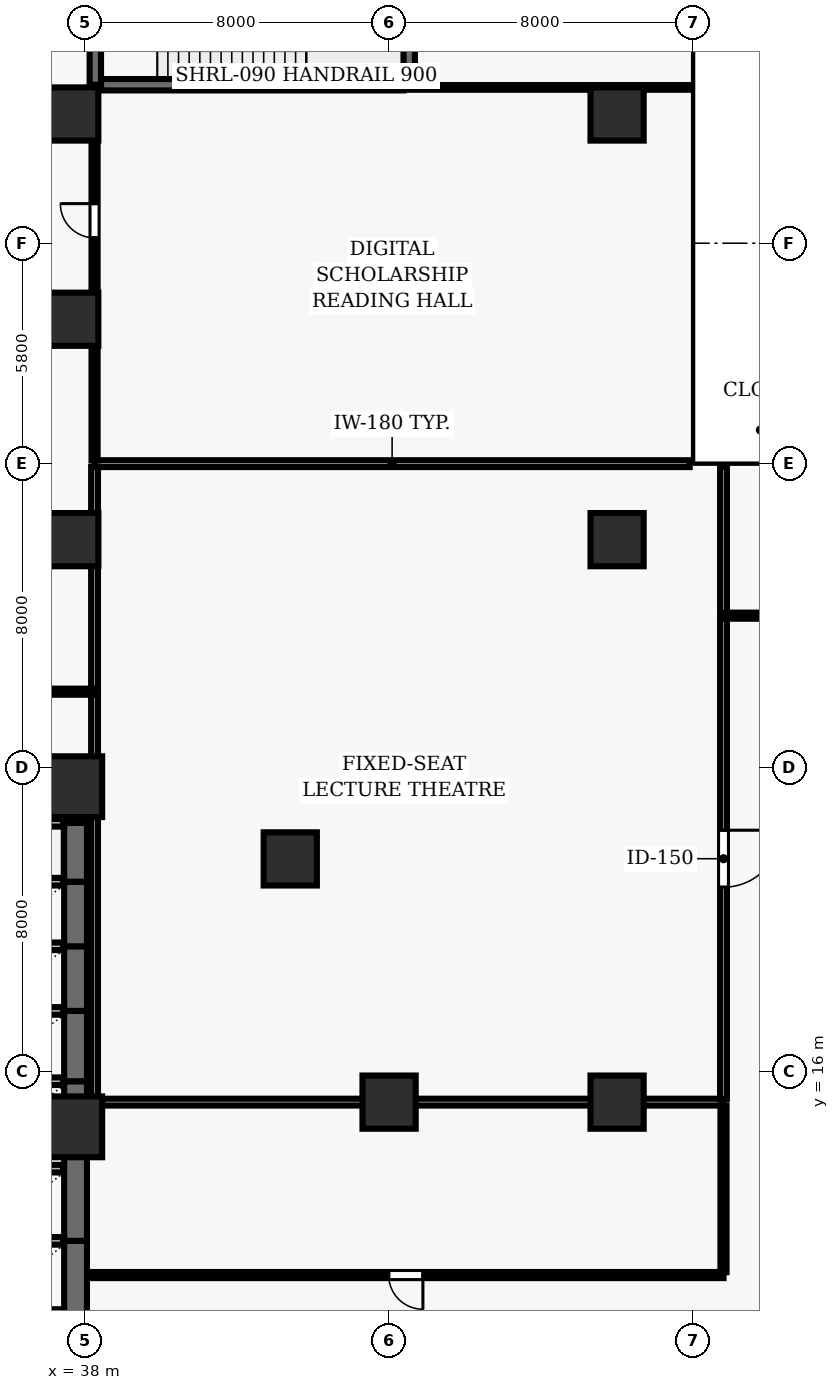
"""IFC4 building model, lengths in metres.
Left out: names, types, materials, properties, quantities, classifications, styles, units other than length and angle.
Written with IfcOpenShell. Run it as: python <this file> out.ifc"""

import sys

from ifc_helpers import new_model, si_unit, direction, frame, frame_2d, origin, origin_2d, place, context, subcontext, project, spatial, rectangle, extrude, element, fill, save


model = new_model("IFC4")
c1 = context("Model", 3, precision=1e-05, world=origin(), true_north=direction((0.0, 1.0)))
c2 = subcontext(c1, "Body", "Model", "MODEL_VIEW")
j1 = project(units=[si_unit("LENGTHUNIT", "METRE"), si_unit("PLANEANGLEUNIT", "RADIAN")], contexts=[c1])
p1 = place(None, origin())
s1 = spatial("IfcSite", under=j1, at=p1, CompositionType="ELEMENT")
p2 = place(p1, origin())
s2 = spatial("IfcBuilding", under=s1, at=p2, CompositionType="ELEMENT")
p3 = place(p2, frame((0.0, 0.0, 10.4)))
s3 = spatial("IfcBuildingStorey", under=s2, at=p3, CompositionType="ELEMENT", Elevation=10.4)
for number, where, z_axis, x_axis in (
    (1, (37.65, 14.55, 0.0), (0.0, 0.0, 1.0), (1.0, 0.0, 0.0)),
    (2, (37.65, 23.5, 0.0), (0.0, 0.0, 1.0), (1.0, 0.0, 0.0)),
):
    element("IfcColumn", number, at=place(p3, frame(where, z_axis=z_axis, x_axis=x_axis)), inside=s3, PredefinedType="COLUMN", context=c2, shape_type="SweptSolid", body=[
        extrude(rectangle(XDim=1.6, YDim=1.6, at=origin_2d()), origin(), (0.0, 0.0, 1.0), 5.2),
    ])
for number, where, z_axis, x_axis in (
    (3, (46.0, 15.2, 0.0), (0.0, 0.0, 1.0), (1.0, 0.0, 0.0)),
    (4, (52.0, 15.2, 0.0), (0.0, 0.0, 1.0), (1.0, 0.0, 0.0)),
    (5, (37.65, 30.0, 0.0), (0.0, 0.0, 1.0), (1.0, 0.0, 0.0)),
    (6, (37.65, 35.8, 0.0), (0.0, 0.0, 1.0), (1.0, 0.0, 0.0)),
    (7, (37.65, 41.2, 0.0), (0.0, 0.0, 1.0), (1.0, 0.0, 0.0)),
    (8, (43.4, 21.6, 0.0), (0.0, 0.0, 1.0), (1.0, 0.0, 0.0)),
    (9, (52.0, 30.0, 0.0), (0.0, 0.0, 1.0), (1.0, 0.0, 0.0)),
    (10, (52.0, 41.2, 0.0), (0.0, 0.0, 1.0), (1.0, 0.0, 0.0)),
):
    element("IfcColumn", number, at=place(p3, frame(where, z_axis=z_axis, x_axis=x_axis)), inside=s3, PredefinedType="COLUMN", context=c2, shape_type="SweptSolid", body=[
        extrude(rectangle(XDim=1.4, YDim=1.4, at=origin_2d()), origin(), (0.0, 0.0, 1.0), 5.2),
    ])
p4 = place(p3, frame((38.42, 41.97, 0.0), z_axis=(0.0, 0.0, 1.0), x_axis=(1.0, 0.0, 0.0)))
e11 = element("IfcWall", 11, at=p4, inside=s3, PredefinedType="SHEAR", context=c2, shape_type="SweptSolid", body=[
    extrude(rectangle(XDim=7.96, YDim=0.3, at=frame_2d((3.98, 0.0))), origin(), (0.0, 0.0, 1.0), 4.92),
])
p5 = place(p3, frame((46.53, 41.97, 0.0), z_axis=(0.0, 0.0, 1.0), x_axis=(0.0, 1.0, 0.0)))
e12 = element("IfcWall", 12, at=p5, inside=s3, PredefinedType="SHEAR", context=c2, shape_type="SweptSolid", body=[
    extrude(rectangle(XDim=3.41, YDim=0.3, at=frame_2d((1.705, 0.0))), origin(), (0.0, 0.0, 1.0), 4.92),
])
p6 = place(p3, frame((38.27, 45.92, 0.0), z_axis=(0.0, 0.0, 1.0), x_axis=(0.0, -1.0, 0.0)))
e13 = element("IfcWall", 13, at=p6, inside=s3, PredefinedType="SHEAR", context=c2, shape_type="SweptSolid", body=[
    extrude(rectangle(XDim=3.95, YDim=0.3, at=frame_2d((1.975, 0.0))), origin(), (0.0, 0.0, 1.0), 4.92),
])
p7 = place(p6, frame((1.67, 0.0, 0.0)))
e14 = element("IfcOpeningElement", 14, at=p7, cuts=e13, PredefinedType="OPENING", context=c2, shape_type="SweptSolid", body=[
    extrude(rectangle(XDim=1.15, YDim=2.15, at=frame_2d((0.575, 1.075))), frame((0.0, 0.16, 0.0), z_axis=(0.0, -1.0, 0.0), x_axis=(1.0, 0.0, 0.0)), (0.0, 0.0, 1.0), 0.32),
])
p8 = place(p3, frame((37.75, 9.65, 0.0), z_axis=(0.0, 0.0, 1.0), x_axis=(0.0, 1.0, 0.0)))
e15 = element("IfcWall", 15, at=p8, inside=s3, PredefinedType="SHEAR", context=c2, shape_type="SweptSolid", body=[
    extrude(rectangle(XDim=1.9, YDim=0.6, at=frame_2d((0.95, 0.0))), origin(), (0.0, 0.0, 1.0), 4.92),
])
for number, where, z_axis, x_axis in (
    (16, (35.28, 9.65, 0.0), (0.0, 0.0, 1.0), (1.0, 0.0, 0.0)),
    (17, (37.42, 11.55, 0.0), (0.0, 0.0, 1.0), (-1.0, 0.0, 0.0)),
):
    element("IfcWall", number, at=place(p3, frame(where, z_axis=z_axis, x_axis=x_axis)), inside=s3, PredefinedType="SOLIDWALL", context=c2, shape_type="SweptSolid", body=[
        extrude(rectangle(XDim=2.14, YDim=0.2, at=frame_2d((1.07, 0.0))), origin(), (0.0, 0.0, 1.0), 4.92),
    ])
p9 = place(p3, frame((37.75, 11.55, 0.0), z_axis=(0.0, 0.0, 1.0), x_axis=(0.0, 1.0, 0.0)))
e18 = element("IfcWall", 18, at=p9, inside=s3, PredefinedType="SHEAR", context=c2, shape_type="SweptSolid", body=[
    extrude(rectangle(XDim=2.35, YDim=0.6, at=frame_2d((1.175, 0.0))), origin(), (0.0, 0.0, 1.0), 4.92),
])
p10 = place(p3, frame((37.42, 13.45, 0.0), z_axis=(0.0, 0.0, 1.0), x_axis=(-1.0, 0.0, 0.0)))
e19 = element("IfcWall", 19, at=p10, inside=s3, PredefinedType="SOLIDWALL", context=c2, shape_type="SweptSolid", body=[
    extrude(rectangle(XDim=2.14, YDim=0.2, at=frame_2d((1.07, 0.0))), origin(), (0.0, 0.0, 1.0), 4.92),
])
p11 = place(p3, frame((37.75, 13.9, 0.0), z_axis=(0.0, 0.0, 1.0), x_axis=(0.0, 1.0, 0.0)))
e20 = element("IfcWall", 20, at=p11, inside=s3, PredefinedType="SHEAR", context=c2, shape_type="SweptSolid", body=[
    extrude(rectangle(XDim=1.85, YDim=0.6, at=frame_2d((0.925, 0.0))), origin(), (0.0, 0.0, 1.0), 4.92),
])
for number, where, z_axis, x_axis in (
    (21, (35.28, 13.9, 0.0), (0.0, 0.0, 1.0), (1.0, 0.0, 0.0)),
    (22, (37.42, 15.75, 0.0), (0.0, 0.0, 1.0), (-1.0, 0.0, 0.0)),
):
    element("IfcWall", number, at=place(p3, frame(where, z_axis=z_axis, x_axis=x_axis)), inside=s3, PredefinedType="SOLIDWALL", context=c2, shape_type="SweptSolid", body=[
        extrude(rectangle(XDim=2.14, YDim=0.2, at=frame_2d((1.07, 0.0))), origin(), (0.0, 0.0, 1.0), 4.92),
    ])
p12 = place(p3, frame((37.75, 15.75, 0.0), z_axis=(0.0, 0.0, 1.0), x_axis=(0.0, 1.0, 0.0)))
e23 = element("IfcWall", 23, at=p12, inside=s3, PredefinedType="SHEAR", context=c2, shape_type="SweptSolid", body=[
    extrude(rectangle(XDim=1.85, YDim=0.6, at=frame_2d((0.925, 0.0))), origin(), (0.0, 0.0, 1.0), 4.92),
])
p13 = place(p3, frame((37.42, 17.6, 0.0), z_axis=(0.0, 0.0, 1.0), x_axis=(-1.0, 0.0, 0.0)))
e24 = element("IfcWall", 24, at=p13, inside=s3, PredefinedType="SOLIDWALL", context=c2, shape_type="SweptSolid", body=[
    extrude(rectangle(XDim=2.14, YDim=0.2, at=frame_2d((1.07, 0.0))), origin(), (0.0, 0.0, 1.0), 4.92),
])
p14 = place(p3, frame((37.75, 17.6, 0.0), z_axis=(0.0, 0.0, 1.0), x_axis=(0.0, 1.0, 0.0)))
e25 = element("IfcWall", 25, at=p14, inside=s3, PredefinedType="SHEAR", context=c2, shape_type="SweptSolid", body=[
    extrude(rectangle(XDim=1.7, YDim=0.6, at=frame_2d((0.85, 0.0))), origin(), (0.0, 0.0, 1.0), 4.92),
])
p15 = place(p3, frame((37.42, 19.3, 0.0), z_axis=(0.0, 0.0, 1.0), x_axis=(-1.0, 0.0, 0.0)))
e26 = element("IfcWall", 26, at=p15, inside=s3, PredefinedType="SOLIDWALL", context=c2, shape_type="SweptSolid", body=[
    extrude(rectangle(XDim=2.14, YDim=0.2, at=frame_2d((1.07, 0.0))), origin(), (0.0, 0.0, 1.0), 4.92),
])
p16 = place(p3, frame((37.75, 19.3, 0.0), z_axis=(0.0, 0.0, 1.0), x_axis=(0.0, 1.0, 0.0)))
e27 = element("IfcWall", 27, at=p16, inside=s3, PredefinedType="SHEAR", context=c2, shape_type="SweptSolid", body=[
    extrude(rectangle(XDim=1.7, YDim=0.6, at=frame_2d((0.85, 0.0))), origin(), (0.0, 0.0, 1.0), 4.92),
])
p17 = place(p3, frame((37.42, 21.0, 0.0), z_axis=(0.0, 0.0, 1.0), x_axis=(-1.0, 0.0, 0.0)))
e28 = element("IfcWall", 28, at=p17, inside=s3, PredefinedType="SOLIDWALL", context=c2, shape_type="SweptSolid", body=[
    extrude(rectangle(XDim=2.14, YDim=0.2, at=frame_2d((1.07, 0.0))), origin(), (0.0, 0.0, 1.0), 4.92),
])
p18 = place(p3, frame((37.75, 21.0, 0.0), z_axis=(0.0, 0.0, 1.0), x_axis=(0.0, 1.0, 0.0)))
e29 = element("IfcWall", 29, at=p18, inside=s3, PredefinedType="SHEAR", context=c2, shape_type="SweptSolid", body=[
    extrude(rectangle(XDim=1.55, YDim=0.6, at=frame_2d((0.775, 0.0))), origin(), (0.0, 0.0, 1.0), 4.92),
])
p19 = place(p3, frame((37.42, 22.55, 0.0), z_axis=(0.0, 0.0, 1.0), x_axis=(-1.0, 0.0, 0.0)))
e30 = element("IfcWall", 30, at=p19, inside=s3, PredefinedType="SOLIDWALL", context=c2, shape_type="SweptSolid", body=[
    extrude(rectangle(XDim=2.14, YDim=0.2, at=frame_2d((1.07, 0.0))), origin(), (0.0, 0.0, 1.0), 4.92),
])
p20 = place(p3, frame((37.75, 22.55, 0.0), z_axis=(0.0, 0.0, 1.0), x_axis=(0.0, 1.0, 0.0)))
e31 = element("IfcWall", 31, at=p20, inside=s3, PredefinedType="SHEAR", context=c2, shape_type="SweptSolid", body=[
    extrude(rectangle(XDim=1.5, YDim=0.6, at=frame_2d((0.75, 0.0))), origin(), (0.0, 0.0, 1.0), 4.92),
])
p21 = place(p3, frame((37.42, 24.05, 0.0), z_axis=(0.0, 0.0, 1.0), x_axis=(-1.0, 0.0, 0.0)))
e32 = element("IfcWall", 32, at=p21, inside=s3, PredefinedType="SOLIDWALL", context=c2, shape_type="SweptSolid", body=[
    extrude(rectangle(XDim=2.14, YDim=0.2, at=frame_2d((1.07, 0.0))), origin(), (0.0, 0.0, 1.0), 4.92),
])
p22 = place(p3, frame((35.15, 26.0, 0.0), z_axis=(0.0, 0.0, 1.0), x_axis=(1.0, 0.0, 0.0)))
e33 = element("IfcWall", 33, at=p22, inside=s3, PredefinedType="PARTITIONING", context=c2, shape_type="SweptSolid", body=[
    extrude(rectangle(XDim=3.1, YDim=0.16, at=frame_2d((1.55, 0.0))), origin(), (0.0, 0.0, 1.0), 4.92),
])
p23 = place(p3, frame((38.25, 15.2, 0.0), z_axis=(0.0, 0.0, 1.0), x_axis=(1.0, 0.0, 0.0)))
e34 = element("IfcWall", 34, at=p23, inside=s3, PredefinedType="PARTITIONING", context=c2, shape_type="SweptSolid", body=[
    extrude(rectangle(XDim=16.55, YDim=0.18, at=frame_2d((8.275, 0.0))), origin(), (0.0, 0.0, 1.0), 4.065),
])
p24 = place(p3, frame((38.25, 32.0, 0.0), z_axis=(0.0, 0.0, 1.0), x_axis=(1.0, 0.0, 0.0)))
e35 = element("IfcWall", 35, at=p24, inside=s3, PredefinedType="PARTITIONING", context=c2, shape_type="SweptSolid", body=[
    extrude(rectangle(XDim=15.66, YDim=0.18, at=frame_2d((7.83, 0.0))), origin(), (0.0, 0.0, 1.0), 4.92),
])
p25 = place(p3, frame((53.91, 41.9, 0.0), z_axis=(0.0, 0.0, 1.0), x_axis=(-1.0, 0.0, 0.0)))
e36 = element("IfcWall", 36, at=p25, inside=s3, PredefinedType="PARTITIONING", context=c2, shape_type="SweptSolid", body=[
    extrude(rectangle(XDim=7.53, YDim=0.125, at=frame_2d((3.765, 0.0))), origin(), (0.0, 0.0, 1.0), 4.92),
])
p26 = place(p3, frame((54.8, 10.65, 0.0), z_axis=(0.0, 0.0, 1.0), x_axis=(-1.0, 0.0, 0.0)))
e37 = element("IfcWall", 37, at=p26, inside=s3, PredefinedType="PARTITIONING", context=c2, shape_type="SweptSolid", body=[
    extrude(rectangle(XDim=16.72, YDim=0.16, at=frame_2d((8.36, 0.0))), origin(), (0.0, 0.0, 1.0), 4.451),
])
p27 = place(p26, frame((7.91, 0.0, 0.0)))
e38 = element("IfcOpeningElement", 38, at=p27, cuts=e37, PredefinedType="OPENING", context=c2, shape_type="SweptSolid", body=[
    extrude(rectangle(XDim=0.9, YDim=2.1, at=frame_2d((0.45, 1.05))), frame((0.0, 0.09, 0.0), z_axis=(0.0, -1.0, 0.0), x_axis=(1.0, 0.0, 0.0)), (0.0, 0.0, 1.0), 0.18),
])
p28 = place(p3, frame((58.45, 28.0, 0.0), z_axis=(0.0, 0.0, 1.0), x_axis=(-1.0, 0.0, 0.0)))
e39 = element("IfcWall", 39, at=p28, inside=s3, PredefinedType="PARTITIONING", context=c2, shape_type="SweptSolid", body=[
    extrude(rectangle(XDim=3.65, YDim=0.16, at=frame_2d((1.825, 0.0))), origin(), (0.0, 0.0, 1.0), 4.92),
])
p29 = place(p3, frame((38.25, 25.925, 0.0), z_axis=(0.0, 0.0, 1.0), x_axis=(0.0, -1.0, 0.0)))
e40 = element("IfcWall", 40, at=p29, inside=s3, PredefinedType="PARTITIONING", context=c2, shape_type="SweptSolid", body=[
    extrude(rectangle(XDim=10.64, YDim=0.18, at=frame_2d((5.32, 0.0))), origin(), (0.0, 0.0, 1.0), 4.92),
])
p30 = place(p3, frame((38.25, 26.075, 0.0), z_axis=(0.0, 0.0, 1.0), x_axis=(0.0, 1.0, 0.0)))
e41 = element("IfcWall", 41, at=p30, inside=s3, PredefinedType="PARTITIONING", context=c2, shape_type="SweptSolid", body=[
    extrude(rectangle(XDim=5.84, YDim=0.18, at=frame_2d((2.92, 0.0))), origin(), (0.0, 0.0, 1.0), 4.92),
])
p31 = place(p3, frame((38.25, 32.085, 0.0), z_axis=(0.0, 0.0, 1.0), x_axis=(0.0, 1.0, 0.0)))
e42 = element("IfcWall", 42, at=p31, inside=s3, PredefinedType="PARTITIONING", context=c2, shape_type="SweptSolid", body=[
    extrude(rectangle(XDim=9.815, YDim=0.16, at=frame_2d((4.907, 0.0))), origin(), (0.0, 0.0, 1.0), 4.92),
])
p32 = place(p31, frame((5.857, 0.0, 0.0)))
e43 = element("IfcOpeningElement", 43, at=p32, cuts=e42, PredefinedType="OPENING", context=c2, shape_type="SweptSolid", body=[
    extrude(rectangle(XDim=0.9, YDim=2.1, at=frame_2d((0.45, 1.05))), frame((0.0, 0.09, 0.0), z_axis=(0.0, -1.0, 0.0), x_axis=(1.0, 0.0, 0.0)), (0.0, 0.0, 1.0), 0.18),
])
p33 = place(p3, frame((54.8, 15.115, 0.0), z_axis=(0.0, 0.0, 1.0), x_axis=(0.0, -1.0, 0.0)))
e44 = element("IfcWall", 44, at=p33, inside=s3, PredefinedType="PARTITIONING", context=c2, shape_type="SweptSolid", body=[
    extrude(rectangle(XDim=4.39, YDim=0.16, at=frame_2d((2.195, 0.0))), origin(), (0.0, 0.0, 1.0), 4.92),
])
p34 = place(p3, frame((54.8, 28.075, 0.0), z_axis=(0.0, 0.0, 1.0), x_axis=(0.0, 1.0, 0.0)))
e45 = element("IfcWall", 45, at=p34, inside=s3, PredefinedType="PARTITIONING", context=c2, shape_type="SweptSolid", body=[
    extrude(rectangle(XDim=3.835, YDim=0.18, at=frame_2d((1.917, 0.0))), origin(), (0.0, 0.0, 1.0), 4.451),
])
p35 = place(p3, frame((54.8, 27.925, 0.0), z_axis=(0.0, 0.0, 1.0), x_axis=(0.0, -1.0, 0.0)))
e46 = element("IfcWall", 46, at=p35, inside=s3, PredefinedType="PARTITIONING", context=c2, shape_type="SweptSolid", body=[
    extrude(rectangle(XDim=12.64, YDim=0.18, at=frame_2d((6.32, 0.0))), origin(), (0.0, 0.0, 1.0), 4.451),
])
p36 = place(p35, frame((5.57, 0.0, 0.0)))
e47 = element("IfcOpeningElement", 47, at=p36, cuts=e46, PredefinedType="OPENING", context=c2, shape_type="SweptSolid", body=[
    extrude(rectangle(XDim=1.5, YDim=2.2, at=frame_2d((0.75, 1.1))), frame((0.0, 0.1, 0.0), z_axis=(0.0, -1.0, 0.0), x_axis=(1.0, 0.0, 0.0)), (0.0, 0.0, 1.0), 0.2),
])
p37 = place(p36, origin())
e48 = element("IfcDoor", 48, at=p37, inside=s3, OperationType="SINGLE_SWING_LEFT", PredefinedType="DOOR", context=c2, shape_type="SweptSolid", body=[
    extrude(rectangle(XDim=1.5, YDim=2.2, at=frame_2d((0.75, 1.1))), frame((0.0, 0.025, 0.0), z_axis=(0.0, -1.0, 0.0), x_axis=(1.0, 0.0, 0.0)), (0.0, 0.0, 1.0), 0.05),
])
fill(e47, e48)
p38 = place(p27, origin())
e49 = element("IfcDoor", 49, at=p38, inside=s3, OperationType="SINGLE_SWING_LEFT", PredefinedType="DOOR", context=c2, shape_type="SweptSolid", body=[
    extrude(rectangle(XDim=0.9, YDim=2.1, at=frame_2d((0.45, 1.05))), frame((0.0, 0.025, 0.0), z_axis=(0.0, -1.0, 0.0), x_axis=(1.0, 0.0, 0.0)), (0.0, 0.0, 1.0), 0.05),
])
fill(e38, e49)
p39 = place(p32, origin())
e50 = element("IfcDoor", 50, at=p39, inside=s3, OperationType="SINGLE_SWING_RIGHT", PredefinedType="DOOR", context=c2, shape_type="SweptSolid", body=[
    extrude(rectangle(XDim=0.9, YDim=2.1, at=frame_2d((0.45, 1.05))), frame((0.0, 0.025, 0.0), z_axis=(0.0, -1.0, 0.0), x_axis=(1.0, 0.0, 0.0)), (0.0, 0.0, 1.0), 0.05),
])
fill(e43, e50)
save(model, sys.argv[1])
